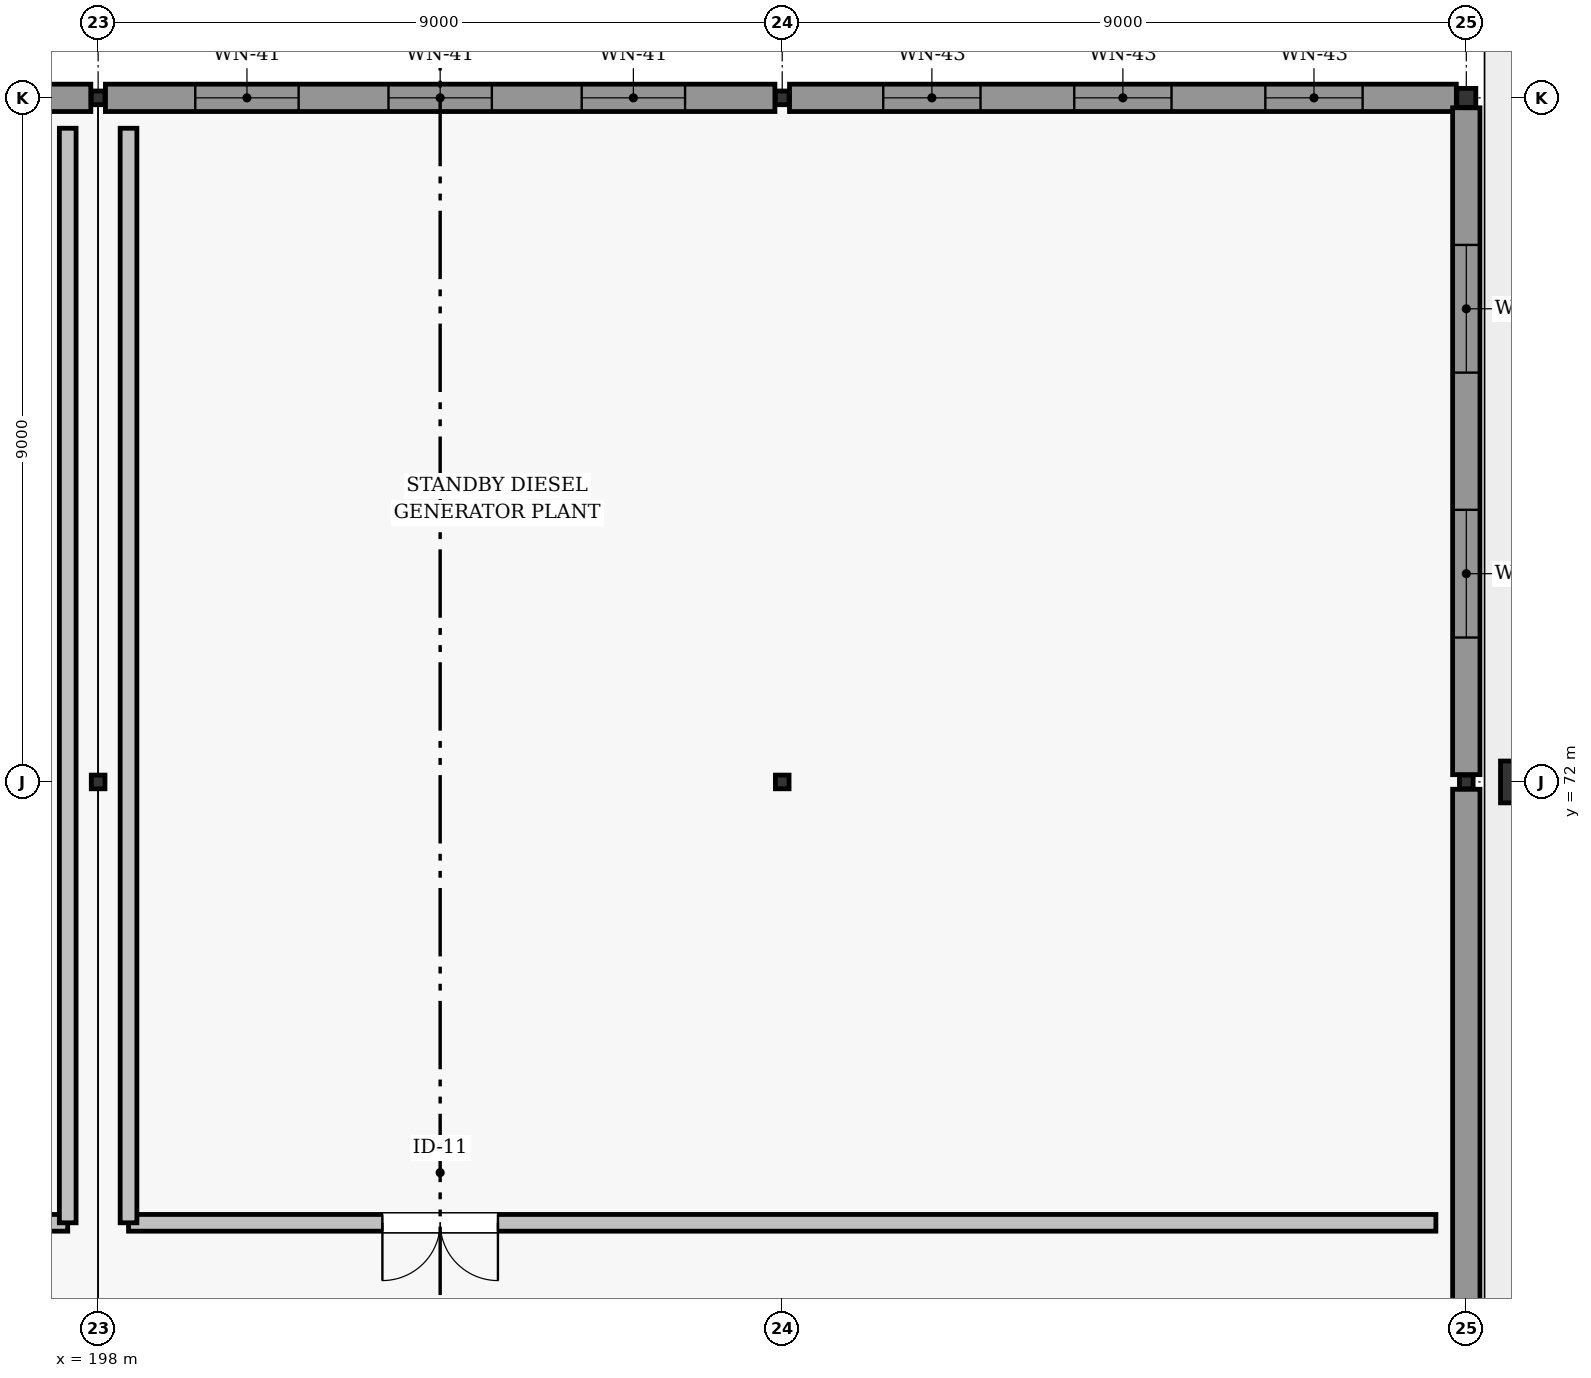
"""IFC4 building model, lengths in metres.
Left out: names, types, materials, properties, quantities, classifications, styles, units other than length and angle.
Written with IfcOpenShell. Run it as: python <this file> out.ifc"""

import sys

from ifc_helpers import new_model, si_unit, direction, frame, frame_2d, origin, origin_2d, place, context, subcontext, project, spatial, rectangle, hollow_rectangle, extrude, element, fill, save


model = new_model("IFC4")
c1 = context("Model", 3, precision=1e-05, world=origin(), true_north=direction((0.0, 1.0)))
c2 = subcontext(c1, "Body", "Model", "MODEL_VIEW")
j1 = project(units=[si_unit("LENGTHUNIT", "METRE"), si_unit("PLANEANGLEUNIT", "RADIAN")], contexts=[c1])
p1 = place(None, origin())
s1 = spatial("IfcSite", under=j1, at=p1, CompositionType="ELEMENT")
p2 = place(p1, origin())
s2 = spatial("IfcBuilding", under=s1, at=p2, CompositionType="ELEMENT")
p3 = place(p2, origin())
s3 = spatial("IfcBuildingStorey", under=s2, at=p3, CompositionType="ELEMENT", Elevation=0.0)
for number, where, z_axis, x_axis in (
    (1, (198.0, 72.0, 0.0), (0.0, 0.0, 1.0), (1.0, 0.0, 0.0)),
    (2, (198.0, 81.0, 0.0), (0.0, 0.0, 1.0), (1.0, 0.0, 0.0)),
    (3, (207.0, 72.0, 0.0), (0.0, 0.0, 1.0), (1.0, 0.0, 0.0)),
    (4, (207.0, 81.0, 0.0), (0.0, 0.0, 1.0), (1.0, 0.0, 0.0)),
    (5, (216.0, 72.0, 0.0), (0.0, 0.0, 1.0), (1.0, 0.0, 0.0)),
):
    element("IfcColumn", number, at=place(p3, frame(where, z_axis=z_axis, x_axis=x_axis)), inside=s3, PredefinedType="COLUMN", context=c2, shape_type="SweptSolid", body=[
        extrude(hollow_rectangle(XDim=0.18, YDim=0.18, WallThickness=0.008, InnerFilletRadius=0.008, OuterFilletRadius=0.016, at=origin_2d()), origin(), (0.0, 0.0, 1.0), 4.8),
    ])
p4 = place(p3, frame((216.0, 81.0, 0.0), z_axis=(0.0, 0.0, 1.0), x_axis=(1.0, 0.0, 0.0)))
e6 = element("IfcColumn", 6, at=p4, inside=s3, PredefinedType="COLUMN", context=c2, shape_type="SweptSolid", body=[
    extrude(hollow_rectangle(XDim=0.25, YDim=0.25, WallThickness=0.01, InnerFilletRadius=0.01, OuterFilletRadius=0.02, at=origin_2d()), origin(), (0.0, 0.0, 1.0), 4.8),
])
p5 = place(p3, frame((216.85, 72.0, 0.0), z_axis=(0.0, 0.0, 1.0), x_axis=(0.0, 1.0, 0.0)))
e7 = element("IfcColumn", 7, at=p5, inside=s3, PredefinedType="PILASTER", context=c2, shape_type="SweptSolid", body=[
    extrude(rectangle(XDim=0.55, YDim=0.8, at=origin_2d()), origin(), (0.0, 0.0, 1.0), 4.8),
])
p6 = place(p3, frame((189.096, 81.0, 0.0), z_axis=(0.0, 0.0, 1.0), x_axis=(1.0, 0.0, 0.0)))
e8 = element("IfcWall", 8, at=p6, inside=s3, PredefinedType="SOLIDWALL", context=c2, shape_type="SweptSolid", body=[
    extrude(rectangle(XDim=8.808, YDim=0.36, at=frame_2d((4.404, 0.0))), origin(), (0.0, 0.0, 1.0), 4.142),
])
p7 = place(p6, frame((1.122, 0.0, 0.85)))
e9 = element("IfcOpeningElement", 9, at=p7, cuts=e8, PredefinedType="OPENING", context=c2, shape_type="SweptSolid", body=[
    extrude(rectangle(XDim=1.44, YDim=1.42, at=frame_2d((0.72, 0.71))), frame((0.0, 0.19, 0.0), z_axis=(0.0, -1.0, 0.0), x_axis=(1.0, 0.0, 0.0)), (0.0, 0.0, 1.0), 0.38),
])
p8 = place(p6, frame((3.684, 0.0, 0.85)))
e10 = element("IfcOpeningElement", 10, at=p8, cuts=e8, PredefinedType="OPENING", context=c2, shape_type="SweptSolid", body=[
    extrude(rectangle(XDim=1.44, YDim=1.42, at=frame_2d((0.72, 0.71))), frame((0.0, 0.19, 0.0), z_axis=(0.0, -1.0, 0.0), x_axis=(1.0, 0.0, 0.0)), (0.0, 0.0, 1.0), 0.38),
])
p9 = place(p6, frame((6.246, 0.0, 0.85)))
e11 = element("IfcOpeningElement", 11, at=p9, cuts=e8, PredefinedType="OPENING", context=c2, shape_type="SweptSolid", body=[
    extrude(rectangle(XDim=1.44, YDim=1.42, at=frame_2d((0.72, 0.71))), frame((0.0, 0.19, 0.0), z_axis=(0.0, -1.0, 0.0), x_axis=(1.0, 0.0, 0.0)), (0.0, 0.0, 1.0), 0.38),
])
p10 = place(p3, frame((198.096, 81.0, 0.0), z_axis=(0.0, 0.0, 1.0), x_axis=(1.0, 0.0, 0.0)))
e12 = element("IfcWall", 12, at=p10, inside=s3, PredefinedType="SOLIDWALL", context=c2, shape_type="SweptSolid", body=[
    extrude(rectangle(XDim=8.808, YDim=0.36, at=frame_2d((4.404, 0.0))), origin(), (0.0, 0.0, 1.0), 4.142),
])
p11 = place(p10, frame((1.182, 0.0, 0.85)))
e13 = element("IfcOpeningElement", 13, at=p11, cuts=e12, PredefinedType="OPENING", context=c2, shape_type="SweptSolid", body=[
    extrude(rectangle(XDim=1.36, YDim=1.38, at=frame_2d((0.68, 0.69))), frame((0.0, 0.19, 0.0), z_axis=(0.0, -1.0, 0.0), x_axis=(1.0, 0.0, 0.0)), (0.0, 0.0, 1.0), 0.38),
])
p12 = place(p10, frame((3.724, 0.0, 0.85)))
e14 = element("IfcOpeningElement", 14, at=p12, cuts=e12, PredefinedType="OPENING", context=c2, shape_type="SweptSolid", body=[
    extrude(rectangle(XDim=1.36, YDim=1.38, at=frame_2d((0.68, 0.69))), frame((0.0, 0.19, 0.0), z_axis=(0.0, -1.0, 0.0), x_axis=(1.0, 0.0, 0.0)), (0.0, 0.0, 1.0), 0.38),
])
p13 = place(p10, frame((6.266, 0.0, 0.85)))
e15 = element("IfcOpeningElement", 15, at=p13, cuts=e12, PredefinedType="OPENING", context=c2, shape_type="SweptSolid", body=[
    extrude(rectangle(XDim=1.36, YDim=1.38, at=frame_2d((0.68, 0.69))), frame((0.0, 0.19, 0.0), z_axis=(0.0, -1.0, 0.0), x_axis=(1.0, 0.0, 0.0)), (0.0, 0.0, 1.0), 0.38),
])
p14 = place(p3, frame((207.096, 81.0, 0.0), z_axis=(0.0, 0.0, 1.0), x_axis=(1.0, 0.0, 0.0)))
e16 = element("IfcWall", 16, at=p14, inside=s3, PredefinedType="SOLIDWALL", context=c2, shape_type="SweptSolid", body=[
    extrude(rectangle(XDim=8.773, YDim=0.36, at=frame_2d((4.386, 0.0))), origin(), (0.0, 0.0, 1.0), 4.142),
])
p15 = place(p14, frame((1.233, 0.0, 0.85)))
e17 = element("IfcOpeningElement", 17, at=p15, cuts=e16, PredefinedType="OPENING", context=c2, shape_type="SweptSolid", body=[
    extrude(rectangle(XDim=1.28, YDim=1.34, at=frame_2d((0.64, 0.67))), frame((0.0, 0.19, 0.0), z_axis=(0.0, -1.0, 0.0), x_axis=(1.0, 0.0, 0.0)), (0.0, 0.0, 1.0), 0.38),
])
p16 = place(p14, frame((3.746, 0.0, 0.85)))
e18 = element("IfcOpeningElement", 18, at=p16, cuts=e16, PredefinedType="OPENING", context=c2, shape_type="SweptSolid", body=[
    extrude(rectangle(XDim=1.28, YDim=1.34, at=frame_2d((0.64, 0.67))), frame((0.0, 0.19, 0.0), z_axis=(0.0, -1.0, 0.0), x_axis=(1.0, 0.0, 0.0)), (0.0, 0.0, 1.0), 0.38),
])
p17 = place(p14, frame((6.26, 0.0, 0.85)))
e19 = element("IfcOpeningElement", 19, at=p17, cuts=e16, PredefinedType="OPENING", context=c2, shape_type="SweptSolid", body=[
    extrude(rectangle(XDim=1.28, YDim=1.34, at=frame_2d((0.64, 0.67))), frame((0.0, 0.19, 0.0), z_axis=(0.0, -1.0, 0.0), x_axis=(1.0, 0.0, 0.0)), (0.0, 0.0, 1.0), 0.38),
])
p18 = place(p3, frame((216.0, 63.106, 0.0), z_axis=(0.0, 0.0, 1.0), x_axis=(0.0, 1.0, 0.0)))
e20 = element("IfcWall", 20, at=p18, inside=s3, PredefinedType="SOLIDWALL", context=c2, shape_type="SweptSolid", body=[
    extrude(rectangle(XDim=8.798, YDim=0.36, at=frame_2d((4.399, 0.0))), origin(), (0.0, 0.0, 1.0), 4.142),
])
p19 = place(p18, frame((0.884, 0.0, 0.0)))
e21 = element("IfcOpeningElement", 21, at=p19, cuts=e20, PredefinedType="OPENING", context=c2, shape_type="SweptSolid", body=[
    extrude(rectangle(XDim=1.12, YDim=2.14, at=frame_2d((0.56, 1.07))), frame((0.0, 0.19, 0.0), z_axis=(0.0, -1.0, 0.0), x_axis=(1.0, 0.0, 0.0)), (0.0, 0.0, 1.0), 0.38),
])
p20 = place(p3, frame((216.0, 72.096, 0.0), z_axis=(0.0, 0.0, 1.0), x_axis=(0.0, 1.0, 0.0)))
e22 = element("IfcWall", 22, at=p20, inside=s3, PredefinedType="SOLIDWALL", context=c2, shape_type="SweptSolid", body=[
    extrude(rectangle(XDim=8.773, YDim=0.36, at=frame_2d((4.386, 0.0))), origin(), (0.0, 0.0, 1.0), 4.142),
])
p21 = place(p20, frame((1.804, 0.0, 0.85)))
e23 = element("IfcOpeningElement", 23, at=p21, cuts=e22, PredefinedType="OPENING", context=c2, shape_type="SweptSolid", body=[
    extrude(rectangle(XDim=1.68, YDim=1.66, at=frame_2d((0.84, 0.83))), frame((0.0, 0.19, 0.0), z_axis=(0.0, -1.0, 0.0), x_axis=(1.0, 0.0, 0.0)), (0.0, 0.0, 1.0), 0.38),
])
p22 = place(p20, frame((5.289, 0.0, 0.85)))
e24 = element("IfcOpeningElement", 24, at=p22, cuts=e22, PredefinedType="OPENING", context=c2, shape_type="SweptSolid", body=[
    extrude(rectangle(XDim=1.68, YDim=1.66, at=frame_2d((0.84, 0.83))), frame((0.0, 0.19, 0.0), z_axis=(0.0, -1.0, 0.0), x_axis=(1.0, 0.0, 0.0)), (0.0, 0.0, 1.0), 0.38),
])
p23 = place(p3, frame((171.4, 66.2, 0.0), z_axis=(0.0, 0.0, 1.0), x_axis=(1.0, 0.0, 0.0)))
e25 = element("IfcWall", 25, at=p23, inside=s3, PredefinedType="SOLIDWALL", context=c2, shape_type="SweptSolid", body=[
    extrude(rectangle(XDim=26.2, YDim=0.22, at=frame_2d((13.1, 0.0))), origin(), (0.0, 0.0, 1.0), 4.145),
])
p24 = place(p23, frame((12.39, 0.0, 0.0)))
e26 = element("IfcOpeningElement", 26, at=p24, cuts=e25, PredefinedType="OPENING", context=c2, shape_type="SweptSolid", body=[
    extrude(rectangle(XDim=1.42, YDim=2.12, at=frame_2d((0.71, 1.06))), frame((0.0, 0.12, 0.0), z_axis=(0.0, -1.0, 0.0), x_axis=(1.0, 0.0, 0.0)), (0.0, 0.0, 1.0), 0.24),
])
p25 = place(p3, frame((197.6, 66.2, 0.0), z_axis=(0.0, 0.0, 1.0), x_axis=(0.0, 1.0, 0.0)))
e27 = element("IfcWall", 27, at=p25, inside=s3, PredefinedType="SOLIDWALL", context=c2, shape_type="SweptSolid", body=[
    extrude(rectangle(XDim=14.4, YDim=0.22, at=frame_2d((7.2, 0.0))), origin(), (0.0, 0.0, 1.0), 4.55),
])
p26 = place(p3, frame((198.4, 66.2, 0.0), z_axis=(0.0, 0.0, 1.0), x_axis=(1.0, 0.0, 0.0)))
e28 = element("IfcWall", 28, at=p26, inside=s3, PredefinedType="SOLIDWALL", context=c2, shape_type="SweptSolid", body=[
    extrude(rectangle(XDim=17.2, YDim=0.22, at=frame_2d((8.6, 0.0))), origin(), (0.0, 0.0, 1.0), 4.145),
])
p27 = place(p26, frame((3.34, 0.0, 0.0)))
e29 = element("IfcOpeningElement", 29, at=p27, cuts=e28, PredefinedType="OPENING", context=c2, shape_type="SweptSolid", body=[
    extrude(rectangle(XDim=1.52, YDim=2.16, at=frame_2d((0.76, 1.08))), frame((0.0, 0.12, 0.0), z_axis=(0.0, -1.0, 0.0), x_axis=(1.0, 0.0, 0.0)), (0.0, 0.0, 1.0), 0.24),
])
p28 = place(p3, frame((198.4, 66.2, 0.0), z_axis=(0.0, 0.0, 1.0), x_axis=(0.0, 1.0, 0.0)))
e30 = element("IfcWall", 30, at=p28, inside=s3, PredefinedType="SOLIDWALL", context=c2, shape_type="SweptSolid", body=[
    extrude(rectangle(XDim=14.4, YDim=0.22, at=frame_2d((7.2, 0.0))), origin(), (0.0, 0.0, 1.0), 4.55),
])
p29 = place(p11, origin())
e31 = element("IfcWindow", 31, at=p29, inside=s3, PartitioningType="SINGLE_PANEL", PredefinedType="WINDOW", context=c2, shape_type="SweptSolid", body=[
    extrude(rectangle(XDim=1.36, YDim=1.38, at=frame_2d((0.68, 0.69))), frame((0.0, 0.03, 0.0), z_axis=(0.0, -1.0, 0.0), x_axis=(1.0, 0.0, 0.0)), (0.0, 0.0, 1.0), 0.06),
])
fill(e13, e31)
p30 = place(p12, origin())
e32 = element("IfcWindow", 32, at=p30, inside=s3, PartitioningType="SINGLE_PANEL", PredefinedType="WINDOW", context=c2, shape_type="SweptSolid", body=[
    extrude(rectangle(XDim=1.36, YDim=1.38, at=frame_2d((0.68, 0.69))), frame((0.0, 0.03, 0.0), z_axis=(0.0, -1.0, 0.0), x_axis=(1.0, 0.0, 0.0)), (0.0, 0.0, 1.0), 0.06),
])
fill(e14, e32)
p31 = place(p13, origin())
e33 = element("IfcWindow", 33, at=p31, inside=s3, PartitioningType="SINGLE_PANEL", PredefinedType="WINDOW", context=c2, shape_type="SweptSolid", body=[
    extrude(rectangle(XDim=1.36, YDim=1.38, at=frame_2d((0.68, 0.69))), frame((0.0, 0.03, 0.0), z_axis=(0.0, -1.0, 0.0), x_axis=(1.0, 0.0, 0.0)), (0.0, 0.0, 1.0), 0.06),
])
fill(e15, e33)
p32 = place(p15, origin())
e34 = element("IfcWindow", 34, at=p32, inside=s3, PartitioningType="SINGLE_PANEL", PredefinedType="WINDOW", context=c2, shape_type="SweptSolid", body=[
    extrude(rectangle(XDim=1.28, YDim=1.34, at=frame_2d((0.64, 0.67))), frame((0.0, 0.03, 0.0), z_axis=(0.0, -1.0, 0.0), x_axis=(1.0, 0.0, 0.0)), (0.0, 0.0, 1.0), 0.06),
])
fill(e17, e34)
p33 = place(p16, origin())
e35 = element("IfcWindow", 35, at=p33, inside=s3, PartitioningType="SINGLE_PANEL", PredefinedType="WINDOW", context=c2, shape_type="SweptSolid", body=[
    extrude(rectangle(XDim=1.28, YDim=1.34, at=frame_2d((0.64, 0.67))), frame((0.0, 0.03, 0.0), z_axis=(0.0, -1.0, 0.0), x_axis=(1.0, 0.0, 0.0)), (0.0, 0.0, 1.0), 0.06),
])
fill(e18, e35)
p34 = place(p17, origin())
e36 = element("IfcWindow", 36, at=p34, inside=s3, PartitioningType="SINGLE_PANEL", PredefinedType="WINDOW", context=c2, shape_type="SweptSolid", body=[
    extrude(rectangle(XDim=1.28, YDim=1.34, at=frame_2d((0.64, 0.67))), frame((0.0, 0.03, 0.0), z_axis=(0.0, -1.0, 0.0), x_axis=(1.0, 0.0, 0.0)), (0.0, 0.0, 1.0), 0.06),
])
fill(e19, e36)
p35 = place(p21, origin())
e37 = element("IfcWindow", 37, at=p35, inside=s3, PartitioningType="SINGLE_PANEL", PredefinedType="WINDOW", context=c2, shape_type="SweptSolid", body=[
    extrude(rectangle(XDim=1.68, YDim=1.66, at=frame_2d((0.84, 0.83))), frame((0.0, 0.03, 0.0), z_axis=(0.0, -1.0, 0.0), x_axis=(1.0, 0.0, 0.0)), (0.0, 0.0, 1.0), 0.06),
])
fill(e23, e37)
p36 = place(p22, origin())
e38 = element("IfcWindow", 38, at=p36, inside=s3, PartitioningType="SINGLE_PANEL", PredefinedType="WINDOW", context=c2, shape_type="SweptSolid", body=[
    extrude(rectangle(XDim=1.68, YDim=1.66, at=frame_2d((0.84, 0.83))), frame((0.0, 0.03, 0.0), z_axis=(0.0, -1.0, 0.0), x_axis=(1.0, 0.0, 0.0)), (0.0, 0.0, 1.0), 0.06),
])
fill(e24, e38)
p37 = place(p27, frame((1.52, 0.0, 0.0), z_axis=(0.0, 0.0, 1.0), x_axis=(-1.0, 0.0, 0.0)))
e39 = element("IfcDoor", 39, at=p37, inside=s3, OperationType="DOUBLE_SWING_LEFT", PredefinedType="DOOR", context=c2, shape_type="SweptSolid", body=[
    extrude(rectangle(XDim=1.52, YDim=2.16, at=frame_2d((0.76, 1.08))), frame((0.0, 0.025, 0.0), z_axis=(0.0, -1.0, 0.0), x_axis=(1.0, 0.0, 0.0)), (0.0, 0.0, 1.0), 0.05),
])
fill(e29, e39)
save(model, sys.argv[1])
